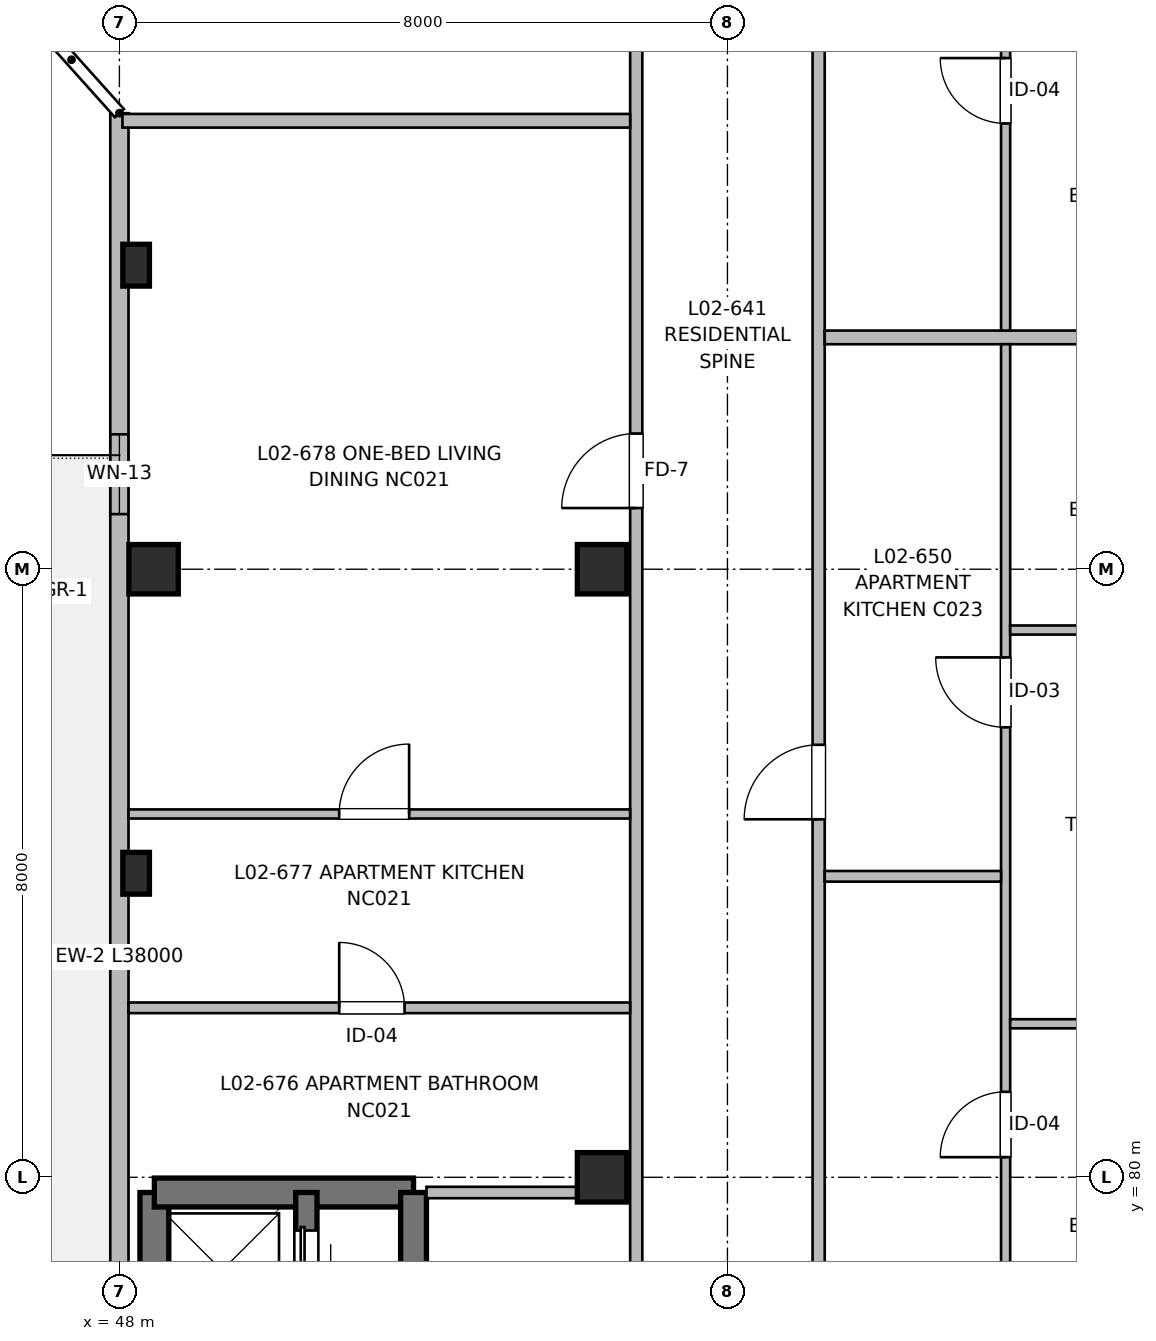
"""IFC4 building model, lengths in metres.
Left out: names, types, materials, properties, quantities, classifications, styles, units other than length and angle.
Written with IfcOpenShell. Run it as: python <this file> out.ifc"""

import sys

from ifc_helpers import new_model, si_unit, direction, frame, frame_2d, origin, origin_2d, place, context, subcontext, project, spatial, rectangle, extrude, element, fill, save


model = new_model("IFC4")
c1 = context("Model", 3, precision=1e-05, world=origin(), true_north=direction((0.0, 1.0)))
c2 = subcontext(c1, "Body", "Model", "MODEL_VIEW")
j1 = project(units=[si_unit("LENGTHUNIT", "METRE"), si_unit("PLANEANGLEUNIT", "RADIAN")], contexts=[c1])
p1 = place(None, origin())
s1 = spatial("IfcSite", under=j1, at=p1, CompositionType="ELEMENT")
p2 = place(p1, origin())
s2 = spatial("IfcBuilding", under=s1, at=p2, CompositionType="ELEMENT")
p3 = place(p2, frame((0.0, 0.0, 7.36)))
s3 = spatial("IfcBuildingStorey", under=s2, at=p3, CompositionType="ELEMENT", Elevation=7.36)
for number, where, z_axis, x_axis in (
    (1, (48.22, 84.0, 0.0), (0.0, 0.0, 1.0), (1.0, 0.0, 0.0)),
    (2, (48.22, 92.0, 0.0), (0.0, 0.0, 1.0), (1.0, 0.0, 0.0)),
):
    element("IfcColumn", number, at=place(p3, frame(where, z_axis=z_axis, x_axis=x_axis)), inside=s3, PredefinedType="PILASTER", context=c2, shape_type="SweptSolid", body=[
        extrude(rectangle(XDim=0.35, YDim=0.55, at=origin_2d()), origin(), (0.0, 0.0, 1.0), 3.2),
    ])
for number, where, z_axis, x_axis in (
    (3, (48.45, 88.0, 0.0), (0.0, 0.0, 1.0), (1.0, 0.0, 0.0)),
    (4, (54.35, 80.0, 0.0), (0.0, 0.0, 1.0), (1.0, 0.0, 0.0)),
    (5, (54.35, 88.0, 0.0), (0.0, 0.0, 1.0), (1.0, 0.0, 0.0)),
):
    element("IfcColumn", number, at=place(p3, frame(where, z_axis=z_axis, x_axis=x_axis)), inside=s3, PredefinedType="COLUMN", context=c2, shape_type="SweptSolid", body=[
        extrude(rectangle(XDim=0.65, YDim=0.65, at=origin_2d()), origin(), (0.0, 0.0, 1.0), 3.2),
    ])
p4 = place(p3, frame((48.46, 67.35, 0.0), z_axis=(0.0, 0.0, 1.0), x_axis=(0.0, 1.0, 0.0)))
e6 = element("IfcWall", 6, at=p4, inside=s3, PredefinedType="SHEAR", context=c2, shape_type="SweptSolid", body=[
    extrude(rectangle(XDim=12.45, YDim=0.38, at=frame_2d((6.225, 0.0))), origin(), (0.0, 0.0, 1.0), 3.2),
])
p5 = place(p4, frame((2.2, 0.0, 0.97)))
e7 = element("IfcOpeningElement", 7, at=p5, cuts=e6, PredefinedType="OPENING", context=c2, shape_type="SweptSolid", body=[
    extrude(rectangle(XDim=0.95, YDim=1.25, at=frame_2d((0.475, 0.625))), frame((0.0, 0.2, 0.0), z_axis=(0.0, -1.0, 0.0), x_axis=(1.0, 0.0, 0.0)), (0.0, 0.0, 1.0), 0.4),
])
p6 = place(p3, frame((48.46, 79.8, 0.0), z_axis=(0.0, 0.0, 1.0), x_axis=(1.0, 0.0, 0.0)))
e8 = element("IfcWall", 8, at=p6, inside=s3, PredefinedType="SHEAR", context=c2, shape_type="SweptSolid", body=[
    extrude(rectangle(XDim=3.41, YDim=0.38, at=frame_2d((1.705, 0.0))), origin(), (0.0, 0.0, 1.0), 3.2),
])
p7 = place(p3, frame((51.87, 79.8, 0.0), z_axis=(0.0, 0.0, 1.0), x_axis=(0.0, -1.0, 0.0)))
e9 = element("IfcWall", 9, at=p7, inside=s3, PredefinedType="SHEAR", context=c2, shape_type="SweptSolid", body=[
    extrude(rectangle(XDim=12.45, YDim=0.34, at=frame_2d((6.225, 0.0))), origin(), (0.0, 0.0, 1.0), 3.2),
])
p8 = place(p7, frame((10.85, 0.0, 0.0)))
e10 = element("IfcOpeningElement", 10, at=p8, cuts=e9, PredefinedType="OPENING", context=c2, shape_type="SweptSolid", body=[
    extrude(rectangle(XDim=1.05, YDim=2.15, at=frame_2d((0.525, 1.075))), frame((0.0, 0.18, 0.0), z_axis=(0.0, -1.0, 0.0), x_axis=(1.0, 0.0, 0.0)), (0.0, 0.0, 1.0), 0.36),
])
p9 = place(p3, frame((50.46, 74.55, 0.0), z_axis=(0.0, 0.0, 1.0), x_axis=(0.0, 1.0, 0.0)))
e11 = element("IfcWall", 11, at=p9, inside=s3, PredefinedType="SHEAR", context=c2, shape_type="SweptSolid", body=[
    extrude(rectangle(XDim=5.25, YDim=0.28, at=frame_2d((2.625, 0.0))), origin(), (0.0, 0.0, 1.0), 3.2),
])
p10 = place(p9, frame((1.15, 0.0, 0.0)))
e12 = element("IfcOpeningElement", 12, at=p10, cuts=e11, PredefinedType="OPENING", context=c2, shape_type="SweptSolid", body=[
    extrude(rectangle(XDim=1.0, YDim=2.15, at=frame_2d((0.5, 1.075))), frame((0.0, 0.15, 0.0), z_axis=(0.0, -1.0, 0.0), x_axis=(1.0, 0.0, 0.0)), (0.0, 0.0, 1.0), 0.3),
])
p11 = place(p9, frame((3.85, 0.0, 0.0)))
e13 = element("IfcOpeningElement", 13, at=p11, cuts=e11, PredefinedType="OPENING", context=c2, shape_type="SweptSolid", body=[
    extrude(rectangle(XDim=0.9, YDim=2.15, at=frame_2d((0.45, 1.075))), frame((0.0, 0.15, 0.0), z_axis=(0.0, -1.0, 0.0), x_axis=(1.0, 0.0, 0.0)), (0.0, 0.0, 1.0), 0.3),
])
p12 = place(p3, frame((48.0, 56.0, 0.0), z_axis=(0.0, 0.0, 1.0), x_axis=(0.0, 1.0, 0.0)))
e14 = element("IfcWall", 14, at=p12, inside=s3, PredefinedType="SOLIDWALL", context=c2, shape_type="SweptSolid", body=[
    extrude(rectangle(XDim=38.0, YDim=0.24, at=frame_2d((19.0, 0.0))), origin(), (0.0, 0.0, 1.0), 2.98),
])
p13 = place(p12, frame((4.95, 0.0, 0.0)))
e15 = element("IfcOpeningElement", 15, at=p13, cuts=e14, PredefinedType="OPENING", context=c2, shape_type="SweptSolid", body=[
    extrude(rectangle(XDim=1.2, YDim=2.2, at=frame_2d((0.6, 1.1))), frame((0.0, 0.13, 0.0), z_axis=(0.0, -1.0, 0.0), x_axis=(1.0, 0.0, 0.0)), (0.0, 0.0, 1.0), 0.26),
])
p14 = place(p12, frame((13.2, 0.0, 0.67)))
e16 = element("IfcOpeningElement", 16, at=p14, cuts=e14, PredefinedType="OPENING", context=c2, shape_type="SweptSolid", body=[
    extrude(rectangle(XDim=2.1, YDim=1.55, at=frame_2d((1.05, 0.775))), frame((0.0, 0.13, 0.0), z_axis=(0.0, -1.0, 0.0), x_axis=(1.0, 0.0, 0.0)), (0.0, 0.0, 1.0), 0.26),
])
p15 = place(p12, frame((18.825, 0.0, 0.72)))
e17 = element("IfcOpeningElement", 17, at=p15, cuts=e14, PredefinedType="OPENING", context=c2, shape_type="SweptSolid", body=[
    extrude(rectangle(XDim=2.25, YDim=1.5, at=frame_2d((1.125, 0.75))), frame((0.0, 0.13, 0.0), z_axis=(0.0, -1.0, 0.0), x_axis=(1.0, 0.0, 0.0)), (0.0, 0.0, 1.0), 0.26),
])
p16 = place(p12, frame((32.725, 0.0, 0.9)))
e18 = element("IfcOpeningElement", 18, at=p16, cuts=e14, PredefinedType="OPENING", context=c2, shape_type="SweptSolid", body=[
    extrude(rectangle(XDim=1.05, YDim=1.15, at=frame_2d((0.525, 0.575))), frame((0.0, 0.13, 0.0), z_axis=(0.0, -1.0, 0.0), x_axis=(1.0, 0.0, 0.0)), (0.0, 0.0, 1.0), 0.26),
])
p17 = place(p3, frame((52.04, 79.8, 0.0), z_axis=(0.0, 0.0, 1.0), x_axis=(1.0, 0.0, 0.0)))
e19 = element("IfcWall", 19, at=p17, inside=s3, PredefinedType="PARTITIONING", context=c2, shape_type="SweptSolid", body=[
    extrude(rectangle(XDim=2.68, YDim=0.15, at=frame_2d((1.34, 0.0))), origin(), (0.0, 0.0, 1.0), 2.935),
])
p18 = place(p3, frame((54.8, 56.18, 0.0), z_axis=(0.0, 0.0, 1.0), x_axis=(0.0, 1.0, 0.0)))
e20 = element("IfcWall", 20, at=p18, inside=s3, PredefinedType="PARTITIONING", context=c2, shape_type="SweptSolid", body=[
    extrude(rectangle(XDim=50.62, YDim=0.16, at=frame_2d((25.31, 0.0))), origin(), (0.0, 0.0, 1.0), 2.935),
])
p19 = place(p18, frame((12.82, 0.0, 0.0)))
e21 = element("IfcOpeningElement", 21, at=p19, cuts=e20, PredefinedType="OPENING", context=c2, shape_type="SweptSolid", body=[
    extrude(rectangle(XDim=1.1, YDim=2.15, at=frame_2d((0.55, 1.075))), frame((0.0, 0.09, 0.0), z_axis=(0.0, -1.0, 0.0), x_axis=(1.0, 0.0, 0.0)), (0.0, 0.0, 1.0), 0.18),
])
p20 = place(p18, frame((19.22, 0.0, 0.0)))
e22 = element("IfcOpeningElement", 22, at=p20, cuts=e20, PredefinedType="OPENING", context=c2, shape_type="SweptSolid", body=[
    extrude(rectangle(XDim=1.6, YDim=2.15, at=frame_2d((0.8, 1.075))), frame((0.0, 0.09, 0.0), z_axis=(0.0, -1.0, 0.0), x_axis=(1.0, 0.0, 0.0)), (0.0, 0.0, 1.0), 0.18),
])
p21 = place(p18, frame((1.8, 0.0, 0.0)))
e23 = element("IfcOpeningElement", 23, at=p21, cuts=e20, PredefinedType="OPENING", context=c2, shape_type="SweptSolid", body=[
    extrude(rectangle(XDim=0.96, YDim=2.15, at=frame_2d((0.48, 1.075))), frame((0.0, 0.09, 0.0), z_axis=(0.0, -1.0, 0.0), x_axis=(1.0, 0.0, 0.0)), (0.0, 0.0, 1.0), 0.18),
])
p22 = place(p18, frame((32.625, 0.0, 0.0)))
e24 = element("IfcOpeningElement", 24, at=p22, cuts=e20, PredefinedType="OPENING", context=c2, shape_type="SweptSolid", body=[
    extrude(rectangle(XDim=0.98, YDim=2.15, at=frame_2d((0.49, 1.075))), frame((0.0, 0.09, 0.0), z_axis=(0.0, -1.0, 0.0), x_axis=(1.0, 0.0, 0.0)), (0.0, 0.0, 1.0), 0.18),
])
p23 = place(p18, frame((41.235, 0.0, 0.0)))
e25 = element("IfcOpeningElement", 25, at=p23, cuts=e20, PredefinedType="OPENING", context=c2, shape_type="SweptSolid", body=[
    extrude(rectangle(XDim=0.98, YDim=2.15, at=frame_2d((0.49, 1.075))), frame((0.0, 0.09, 0.0), z_axis=(0.0, -1.0, 0.0), x_axis=(1.0, 0.0, 0.0)), (0.0, 0.0, 1.0), 0.18),
])
p24 = place(p3, frame((57.2, 56.18, 0.0), z_axis=(0.0, 0.0, 1.0), x_axis=(0.0, 1.0, 0.0)))
e26 = element("IfcWall", 26, at=p24, inside=s3, PredefinedType="PARTITIONING", context=c2, shape_type="SweptSolid", body=[
    extrude(rectangle(XDim=50.62, YDim=0.16, at=frame_2d((25.31, 0.0))), origin(), (0.0, 0.0, 1.0), 2.935),
])
p25 = place(p24, frame((4.51, 0.0, 0.0)))
e27 = element("IfcOpeningElement", 27, at=p25, cuts=e26, PredefinedType="OPENING", context=c2, shape_type="SweptSolid", body=[
    extrude(rectangle(XDim=1.5, YDim=2.2, at=frame_2d((0.75, 1.1))), frame((0.0, 0.09, 0.0), z_axis=(0.0, -1.0, 0.0), x_axis=(1.0, 0.0, 0.0)), (0.0, 0.0, 1.0), 0.18),
])
p26 = place(p24, frame((16.48, 0.0, 0.0)))
e28 = element("IfcOpeningElement", 28, at=p26, cuts=e26, PredefinedType="OPENING", context=c2, shape_type="SweptSolid", body=[
    extrude(rectangle(XDim=0.98, YDim=2.15, at=frame_2d((0.49, 1.075))), frame((0.0, 0.09, 0.0), z_axis=(0.0, -1.0, 0.0), x_axis=(1.0, 0.0, 0.0)), (0.0, 0.0, 1.0), 0.18),
])
p27 = place(p24, frame((28.53, 0.0, 0.0)))
e29 = element("IfcOpeningElement", 29, at=p27, cuts=e26, PredefinedType="OPENING", context=c2, shape_type="SweptSolid", body=[
    extrude(rectangle(XDim=0.98, YDim=2.15, at=frame_2d((0.49, 1.075))), frame((0.0, 0.09, 0.0), z_axis=(0.0, -1.0, 0.0), x_axis=(1.0, 0.0, 0.0)), (0.0, 0.0, 1.0), 0.18),
])
p28 = place(p24, frame((42.88, 0.0, 0.0)))
e30 = element("IfcOpeningElement", 30, at=p28, cuts=e26, PredefinedType="OPENING", context=c2, shape_type="SweptSolid", body=[
    extrude(rectangle(XDim=0.98, YDim=2.15, at=frame_2d((0.49, 1.075))), frame((0.0, 0.09, 0.0), z_axis=(0.0, -1.0, 0.0), x_axis=(1.0, 0.0, 0.0)), (0.0, 0.0, 1.0), 0.18),
])
p29 = place(p3, frame((57.28, 91.05, 0.0), z_axis=(0.0, 0.0, 1.0), x_axis=(1.0, 0.0, 0.0)))
e31 = element("IfcWall", 31, at=p29, inside=s3, PredefinedType="PARTITIONING", context=c2, shape_type="SweptSolid", body=[
    extrude(rectangle(XDim=9.115, YDim=0.18, at=frame_2d((4.558, 0.0))), origin(), (0.0, 0.0, 1.0), 2.935),
])
p30 = place(p3, frame((59.66, 78.0, 0.0), z_axis=(0.0, 0.0, 1.0), x_axis=(0.0, 1.0, 0.0)))
e32 = element("IfcWall", 32, at=p30, inside=s3, PredefinedType="PARTITIONING", context=c2, shape_type="SweptSolid", body=[
    extrude(rectangle(XDim=12.96, YDim=0.12, at=frame_2d((6.48, 0.0))), origin(), (0.0, 0.0, 1.0), 2.935),
])
p31 = place(p30, frame((2.265, 0.0, 0.0)))
e33 = element("IfcOpeningElement", 33, at=p31, cuts=e32, PredefinedType="OPENING", context=c2, shape_type="SweptSolid", body=[
    extrude(rectangle(XDim=0.86, YDim=2.1, at=frame_2d((0.43, 1.05))), frame((0.0, 0.07, 0.0), z_axis=(0.0, -1.0, 0.0), x_axis=(1.0, 0.0, 0.0)), (0.0, 0.0, 1.0), 0.14),
])
p32 = place(p30, frame((7.92, 0.0, 0.0)))
e34 = element("IfcOpeningElement", 34, at=p32, cuts=e32, PredefinedType="OPENING", context=c2, shape_type="SweptSolid", body=[
    extrude(rectangle(XDim=0.92, YDim=2.1, at=frame_2d((0.46, 1.05))), frame((0.0, 0.07, 0.0), z_axis=(0.0, -1.0, 0.0), x_axis=(1.0, 0.0, 0.0)), (0.0, 0.0, 1.0), 0.14),
])
p33 = place(p3, frame((57.28, 83.96, 0.0), z_axis=(0.0, 0.0, 1.0), x_axis=(1.0, 0.0, 0.0)))
e35 = element("IfcWall", 35, at=p33, inside=s3, PredefinedType="PARTITIONING", context=c2, shape_type="SweptSolid", body=[
    extrude(rectangle(XDim=2.32, YDim=0.14, at=frame_2d((1.16, 0.0))), origin(), (0.0, 0.0, 1.0), 2.935),
])
p34 = place(p3, frame((59.72, 82.02, 0.0), z_axis=(0.0, 0.0, 1.0), x_axis=(1.0, 0.0, 0.0)))
e36 = element("IfcWall", 36, at=p34, inside=s3, PredefinedType="PARTITIONING", context=c2, shape_type="SweptSolid", body=[
    extrude(rectangle(XDim=4.16, YDim=0.12, at=frame_2d((2.08, 0.0))), origin(), (0.0, 0.0, 1.0), 2.935),
])
p35 = place(p34, frame((1.63, 0.0, 0.0)))
e37 = element("IfcOpeningElement", 37, at=p35, cuts=e36, PredefinedType="OPENING", context=c2, shape_type="SweptSolid", body=[
    extrude(rectangle(XDim=0.9, YDim=2.1, at=frame_2d((0.45, 1.05))), frame((0.0, 0.07, 0.0), z_axis=(0.0, -1.0, 0.0), x_axis=(1.0, 0.0, 0.0)), (0.0, 0.0, 1.0), 0.14),
])
p36 = place(p3, frame((59.72, 87.2, 0.0), z_axis=(0.0, 0.0, 1.0), x_axis=(1.0, 0.0, 0.0)))
e38 = element("IfcWall", 38, at=p36, inside=s3, PredefinedType="PARTITIONING", context=c2, shape_type="SweptSolid", body=[
    extrude(rectangle(XDim=4.16, YDim=0.12, at=frame_2d((2.08, 0.0))), origin(), (0.0, 0.0, 1.0), 2.935),
])
p37 = place(p36, frame((1.64, 0.0, 0.0)))
e39 = element("IfcOpeningElement", 39, at=p37, cuts=e38, PredefinedType="OPENING", context=c2, shape_type="SweptSolid", body=[
    extrude(rectangle(XDim=0.88, YDim=2.1, at=frame_2d((0.44, 1.05))), frame((0.0, 0.07, 0.0), z_axis=(0.0, -1.0, 0.0), x_axis=(1.0, 0.0, 0.0)), (0.0, 0.0, 1.0), 0.14),
])
p38 = place(p3, frame((59.66, 91.14, 0.0), z_axis=(0.0, 0.0, 1.0), x_axis=(0.0, 1.0, 0.0)))
e40 = element("IfcWall", 40, at=p38, inside=s3, PredefinedType="PARTITIONING", context=c2, shape_type="SweptSolid", body=[
    extrude(rectangle(XDim=15.58, YDim=0.12, at=frame_2d((7.79, 0.0))), origin(), (0.0, 0.0, 1.0), 2.935),
])
p39 = place(p38, frame((2.725, 0.0, 0.0)))
e41 = element("IfcOpeningElement", 41, at=p39, cuts=e40, PredefinedType="OPENING", context=c2, shape_type="SweptSolid", body=[
    extrude(rectangle(XDim=0.86, YDim=2.1, at=frame_2d((0.43, 1.05))), frame((0.0, 0.07, 0.0), z_axis=(0.0, -1.0, 0.0), x_axis=(1.0, 0.0, 0.0)), (0.0, 0.0, 1.0), 0.14),
])
p40 = place(p38, frame((9.525, 0.0, 0.0)))
e42 = element("IfcOpeningElement", 42, at=p40, cuts=e40, PredefinedType="OPENING", context=c2, shape_type="SweptSolid", body=[
    extrude(rectangle(XDim=0.92, YDim=2.1, at=frame_2d((0.46, 1.05))), frame((0.0, 0.07, 0.0), z_axis=(0.0, -1.0, 0.0), x_axis=(1.0, 0.0, 0.0)), (0.0, 0.0, 1.0), 0.14),
])
p41 = place(p3, frame((48.04, 93.9, 0.0), z_axis=(0.0, 0.0, 1.0), x_axis=(1.0, 0.0, 0.0)))
e43 = element("IfcWall", 43, at=p41, inside=s3, PredefinedType="PARTITIONING", context=c2, shape_type="SweptSolid", body=[
    extrude(rectangle(XDim=6.68, YDim=0.18, at=frame_2d((3.34, 0.0))), origin(), (0.0, 0.0, 1.0), 2.935),
])
p42 = place(p3, frame((48.12, 82.23, 0.0), z_axis=(0.0, 0.0, 1.0), x_axis=(1.0, 0.0, 0.0)))
e44 = element("IfcWall", 44, at=p42, inside=s3, PredefinedType="PARTITIONING", context=c2, shape_type="SweptSolid", body=[
    extrude(rectangle(XDim=6.6, YDim=0.14, at=frame_2d((3.3, 0.0))), origin(), (0.0, 0.0, 1.0), 2.935),
])
p43 = place(p42, frame((2.772, 0.0, 0.0)))
e45 = element("IfcOpeningElement", 45, at=p43, cuts=e44, PredefinedType="OPENING", context=c2, shape_type="SweptSolid", body=[
    extrude(rectangle(XDim=0.86, YDim=2.1, at=frame_2d((0.43, 1.05))), frame((0.0, 0.08, 0.0), z_axis=(0.0, -1.0, 0.0), x_axis=(1.0, 0.0, 0.0)), (0.0, 0.0, 1.0), 0.16),
])
p44 = place(p3, frame((48.12, 84.78, 0.0), z_axis=(0.0, 0.0, 1.0), x_axis=(1.0, 0.0, 0.0)))
e46 = element("IfcWall", 46, at=p44, inside=s3, PredefinedType="PARTITIONING", context=c2, shape_type="SweptSolid", body=[
    extrude(rectangle(XDim=6.6, YDim=0.12, at=frame_2d((3.3, 0.0))), origin(), (0.0, 0.0, 1.0), 2.935),
])
p45 = place(p44, frame((2.772, 0.0, 0.0)))
e47 = element("IfcOpeningElement", 47, at=p45, cuts=e46, PredefinedType="OPENING", context=c2, shape_type="SweptSolid", body=[
    extrude(rectangle(XDim=0.92, YDim=2.1, at=frame_2d((0.46, 1.05))), frame((0.0, 0.07, 0.0), z_axis=(0.0, -1.0, 0.0), x_axis=(1.0, 0.0, 0.0)), (0.0, 0.0, 1.0), 0.14),
])
p46 = place(p11, origin())
e48 = element("IfcDoor", 48, at=p46, inside=s3, OperationType="SLIDING_TO_RIGHT", PredefinedType="DOOR", context=c2, shape_type="SweptSolid", body=[
    extrude(rectangle(XDim=0.9, YDim=2.15, at=frame_2d((0.45, 1.075))), frame((0.0, 0.025, 0.0), z_axis=(0.0, -1.0, 0.0), x_axis=(1.0, 0.0, 0.0)), (0.0, 0.0, 1.0), 0.05),
])
fill(e13, e48)
p47 = place(p16, origin())
e49 = element("IfcWindow", 49, at=p47, inside=s3, PartitioningType="SINGLE_PANEL", PredefinedType="WINDOW", context=c2, shape_type="SweptSolid", body=[
    extrude(rectangle(XDim=1.05, YDim=1.15, at=frame_2d((0.525, 0.575))), frame((0.0, 0.03, 0.0), z_axis=(0.0, -1.0, 0.0), x_axis=(1.0, 0.0, 0.0)), (0.0, 0.0, 1.0), 0.06),
])
fill(e18, e49)
p48 = place(p31, origin())
e50 = element("IfcDoor", 50, at=p48, inside=s3, OperationType="SINGLE_SWING_LEFT", PredefinedType="DOOR", context=c2, shape_type="SweptSolid", body=[
    extrude(rectangle(XDim=0.86, YDim=2.1, at=frame_2d((0.43, 1.05))), frame((0.0, 0.025, 0.0), z_axis=(0.0, -1.0, 0.0), x_axis=(1.0, 0.0, 0.0)), (0.0, 0.0, 1.0), 0.05),
])
fill(e33, e50)
p49 = place(p32, origin())
e51 = element("IfcDoor", 51, at=p49, inside=s3, OperationType="SINGLE_SWING_RIGHT", PredefinedType="DOOR", context=c2, shape_type="SweptSolid", body=[
    extrude(rectangle(XDim=0.92, YDim=2.1, at=frame_2d((0.46, 1.05))), frame((0.0, 0.025, 0.0), z_axis=(0.0, -1.0, 0.0), x_axis=(1.0, 0.0, 0.0)), (0.0, 0.0, 1.0), 0.05),
])
fill(e34, e51)
p50 = place(p27, origin())
e52 = element("IfcDoor", 52, at=p50, inside=s3, OperationType="SINGLE_SWING_LEFT", PredefinedType="DOOR", context=c2, shape_type="SweptSolid", body=[
    extrude(rectangle(XDim=0.98, YDim=2.15, at=frame_2d((0.49, 1.075))), frame((0.0, 0.025, 0.0), z_axis=(0.0, -1.0, 0.0), x_axis=(1.0, 0.0, 0.0)), (0.0, 0.0, 1.0), 0.05),
])
fill(e29, e52)
p51 = place(p39, origin())
e53 = element("IfcDoor", 53, at=p51, inside=s3, OperationType="SINGLE_SWING_RIGHT", PredefinedType="DOOR", context=c2, shape_type="SweptSolid", body=[
    extrude(rectangle(XDim=0.86, YDim=2.1, at=frame_2d((0.43, 1.05))), frame((0.0, 0.025, 0.0), z_axis=(0.0, -1.0, 0.0), x_axis=(1.0, 0.0, 0.0)), (0.0, 0.0, 1.0), 0.05),
])
fill(e41, e53)
p52 = place(p43, origin())
e54 = element("IfcDoor", 54, at=p52, inside=s3, OperationType="SINGLE_SWING_LEFT", PredefinedType="DOOR", context=c2, shape_type="SweptSolid", body=[
    extrude(rectangle(XDim=0.86, YDim=2.1, at=frame_2d((0.43, 1.05))), frame((0.0, 0.025, 0.0), z_axis=(0.0, -1.0, 0.0), x_axis=(1.0, 0.0, 0.0)), (0.0, 0.0, 1.0), 0.05),
])
fill(e45, e54)
p53 = place(p45, origin())
e55 = element("IfcDoor", 55, at=p53, inside=s3, OperationType="SINGLE_SWING_RIGHT", PredefinedType="DOOR", context=c2, shape_type="SweptSolid", body=[
    extrude(rectangle(XDim=0.92, YDim=2.1, at=frame_2d((0.46, 1.05))), frame((0.0, 0.025, 0.0), z_axis=(0.0, -1.0, 0.0), x_axis=(1.0, 0.0, 0.0)), (0.0, 0.0, 1.0), 0.05),
])
fill(e47, e55)
p54 = place(p22, origin())
e56 = element("IfcDoor", 56, at=p54, inside=s3, OperationType="SINGLE_SWING_LEFT", PredefinedType="DOOR", context=c2, shape_type="SweptSolid", body=[
    extrude(rectangle(XDim=0.98, YDim=2.15, at=frame_2d((0.49, 1.075))), frame((0.0, 0.025, 0.0), z_axis=(0.0, -1.0, 0.0), x_axis=(1.0, 0.0, 0.0)), (0.0, 0.0, 1.0), 0.05),
])
fill(e24, e56)
save(model, sys.argv[1])
